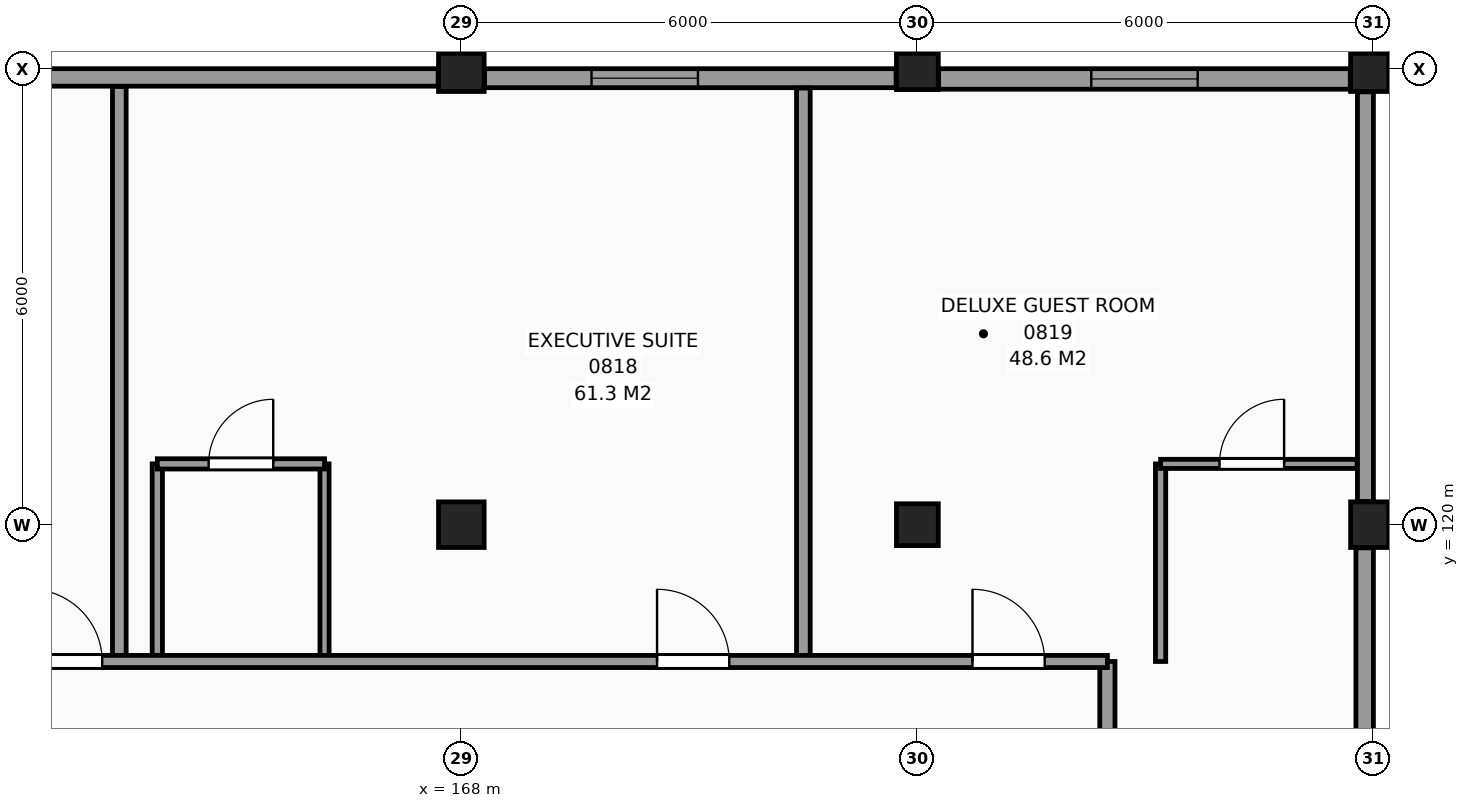
"""IFC4 building model, lengths in metres.
Left out: names, types, materials, properties, quantities, classifications, styles, units other than length and angle.
Written with IfcOpenShell. Run it as: python <this file> out.ifc"""

import sys

from ifc_helpers import new_model, si_unit, direction, frame, frame_2d, origin, origin_2d, place, context, subcontext, project, spatial, rectangle, extrude, element, fill, save


model = new_model("IFC4")
c1 = context("Model", 3, precision=1e-05, world=origin(), true_north=direction((0.0, 1.0)))
c2 = subcontext(c1, "Body", "Model", "MODEL_VIEW")
j1 = project(units=[si_unit("LENGTHUNIT", "METRE"), si_unit("PLANEANGLEUNIT", "RADIAN")], contexts=[c1])
p1 = place(None, origin())
s1 = spatial("IfcSite", under=j1, at=p1, CompositionType="ELEMENT")
p2 = place(p1, origin())
s2 = spatial("IfcBuilding", under=s1, at=p2, CompositionType="ELEMENT")
p3 = place(p2, frame((0.0, 0.0, 34.8)))
s3 = spatial("IfcBuildingStorey", under=s2, at=p3, CompositionType="ELEMENT", Elevation=34.8)
for number, where, z_axis, x_axis in (
    (1, (168.0, 120.0, 0.0), (0.0, 0.0, 1.0), (1.0, 0.0, 0.0)),
    (2, (168.0, 126.0, 0.0), (0.0, 0.0, 1.0), (1.0, 0.0, 0.0)),
):
    element("IfcColumn", number, at=place(p3, frame(where, z_axis=z_axis, x_axis=x_axis)), inside=s3, PredefinedType="COLUMN", context=c2, shape_type="SweptSolid", body=[
        extrude(rectangle(XDim=0.6, YDim=0.6, at=origin_2d()), origin(), (0.0, 0.0, 1.0), 3.3),
    ])
for number, where, z_axis, x_axis in (
    (3, (174.0, 120.0, 0.0), (0.0, 0.0, 1.0), (1.0, 0.0, 0.0)),
    (4, (174.0, 126.0, 0.0), (0.0, 0.0, 1.0), (1.0, 0.0, 0.0)),
):
    element("IfcColumn", number, at=place(p3, frame(where, z_axis=z_axis, x_axis=x_axis)), inside=s3, PredefinedType="COLUMN", context=c2, shape_type="SweptSolid", body=[
        extrude(rectangle(XDim=0.55, YDim=0.55, at=origin_2d()), origin(), (0.0, 0.0, 1.0), 3.3),
    ])
for number, where, z_axis, x_axis in (
    (5, (180.0, 120.0, 0.0), (0.0, 0.0, 1.0), (1.0, 0.0, 0.0)),
    (6, (180.0, 126.0, 0.0), (0.0, 0.0, 1.0), (1.0, 0.0, 0.0)),
):
    element("IfcColumn", number, at=place(p3, frame(where, z_axis=z_axis, x_axis=x_axis)), inside=s3, PredefinedType="COLUMN", context=c2, shape_type="SweptSolid", body=[
        extrude(rectangle(XDim=0.6, YDim=0.6, at=origin_2d()), origin(), (0.0, 0.0, 1.0), 3.3),
    ])
p4 = place(p3, frame((179.885, 114.305, 0.0), z_axis=(0.0, 0.0, 1.0), x_axis=(0.0, 1.0, 0.0)))
e7 = element("IfcWall", 7, at=p4, inside=s3, PredefinedType="SOLIDWALL", context=c2, shape_type="SweptSolid", body=[
    extrude(rectangle(XDim=5.39, YDim=0.23, at=frame_2d((2.695, 0.0))), origin(), (0.0, 0.0, 1.0), 2.42),
])
p5 = place(p3, frame((179.895, 120.305, 0.0), z_axis=(0.0, 0.0, 1.0), x_axis=(0.0, 1.0, 0.0)))
e8 = element("IfcWall", 8, at=p5, inside=s3, PredefinedType="SOLIDWALL", context=c2, shape_type="SweptSolid", body=[
    extrude(rectangle(XDim=5.39, YDim=0.21, at=frame_2d((2.695, 0.0))), origin(), (0.0, 0.0, 1.0), 2.42),
])
p6 = place(p3, frame((179.695, 125.865, 0.0), z_axis=(0.0, 0.0, 1.0), x_axis=(-1.0, 0.0, 0.0)))
e9 = element("IfcWall", 9, at=p6, inside=s3, PredefinedType="SOLIDWALL", context=c2, shape_type="SweptSolid", body=[
    extrude(rectangle(XDim=5.415, YDim=0.27, at=frame_2d((2.708, 0.0))), origin(), (0.0, 0.0, 1.0), 2.42),
])
p7 = place(p6, frame((2.007, 0.0, 0.8)))
e10 = element("IfcOpeningElement", 10, at=p7, cuts=e9, PredefinedType="OPENING", context=c2, shape_type="SweptSolid", body=[
    extrude(rectangle(XDim=1.4, YDim=1.4, at=frame_2d((0.7, 0.7))), frame((0.0, 0.145, 0.0), z_axis=(0.0, -1.0, 0.0), x_axis=(1.0, 0.0, 0.0)), (0.0, 0.0, 1.0), 0.29),
])
p8 = place(p3, frame((173.72, 125.875, 0.0), z_axis=(0.0, 0.0, 1.0), x_axis=(-1.0, 0.0, 0.0)))
e11 = element("IfcWall", 11, at=p8, inside=s3, PredefinedType="SOLIDWALL", context=c2, shape_type="SweptSolid", body=[
    extrude(rectangle(XDim=5.415, YDim=0.25, at=frame_2d((2.708, 0.0))), origin(), (0.0, 0.0, 1.0), 2.42),
])
p9 = place(p8, frame((2.607, 0.0, 0.8)))
e12 = element("IfcOpeningElement", 12, at=p9, cuts=e11, PredefinedType="OPENING", context=c2, shape_type="SweptSolid", body=[
    extrude(rectangle(XDim=1.4, YDim=1.4, at=frame_2d((0.7, 0.7))), frame((0.0, 0.135, 0.0), z_axis=(0.0, -1.0, 0.0), x_axis=(1.0, 0.0, 0.0)), (0.0, 0.0, 1.0), 0.27),
])
p10 = place(p3, frame((167.695, 125.885, 0.0), z_axis=(0.0, 0.0, 1.0), x_axis=(-1.0, 0.0, 0.0)))
e13 = element("IfcWall", 13, at=p10, inside=s3, PredefinedType="SOLIDWALL", context=c2, shape_type="SweptSolid", body=[
    extrude(rectangle(XDim=5.415, YDim=0.23, at=frame_2d((2.708, 0.0))), origin(), (0.0, 0.0, 1.0), 2.42),
])
p11 = place(p3, frame((163.5, 118.2, 0.0), z_axis=(0.0, 0.0, 1.0), x_axis=(0.0, 1.0, 0.0)))
e14 = element("IfcWall", 14, at=p11, inside=s3, PredefinedType="PARTITIONING", context=c2, shape_type="SweptSolid", body=[
    extrude(rectangle(XDim=7.565, YDim=0.18, at=frame_2d((3.782, 0.0))), origin(), (0.0, 0.0, 1.0), 3.07),
])
p12 = place(p3, frame((164.0, 118.2, 0.0), z_axis=(0.0, 0.0, 1.0), x_axis=(0.0, 1.0, 0.0)))
e15 = element("IfcWall", 15, at=p12, inside=s3, PredefinedType="PARTITIONING", context=c2, shape_type="SweptSolid", body=[
    extrude(rectangle(XDim=2.6, YDim=0.135, at=frame_2d((1.3, 0.0))), origin(), (0.0, 0.0, 1.0), 3.07),
])
p13 = place(p3, frame((166.2, 118.2, 0.0), z_axis=(0.0, 0.0, 1.0), x_axis=(0.0, 1.0, 0.0)))
e16 = element("IfcWall", 16, at=p13, inside=s3, PredefinedType="PARTITIONING", context=c2, shape_type="SweptSolid", body=[
    extrude(rectangle(XDim=2.6, YDim=0.12, at=frame_2d((1.3, 0.0))), origin(), (0.0, 0.0, 1.0), 3.07),
])
p14 = place(p3, frame((172.5, 118.2, 0.0), z_axis=(0.0, 0.0, 1.0), x_axis=(0.0, 1.0, 0.0)))
e17 = element("IfcWall", 17, at=p14, inside=s3, PredefinedType="PARTITIONING", context=c2, shape_type="SweptSolid", body=[
    extrude(rectangle(XDim=7.545, YDim=0.18, at=frame_2d((3.772, 0.0))), origin(), (0.0, 0.0, 1.0), 3.07),
])
p15 = place(p3, frame((176.5, 115.8, 0.0), z_axis=(0.0, 0.0, 1.0), x_axis=(0.0, 1.0, 0.0)))
e18 = element("IfcWall", 18, at=p15, inside=s3, PredefinedType="PARTITIONING", context=c2, shape_type="SweptSolid", body=[
    extrude(rectangle(XDim=2.4, YDim=0.2, at=frame_2d((1.2, 0.0))), origin(), (0.0, 0.0, 1.0), 3.07),
])
p16 = place(p3, frame((177.2, 118.2, 0.0), z_axis=(0.0, 0.0, 1.0), x_axis=(0.0, 1.0, 0.0)))
e19 = element("IfcWall", 19, at=p16, inside=s3, PredefinedType="PARTITIONING", context=c2, shape_type="SweptSolid", body=[
    extrude(rectangle(XDim=2.6, YDim=0.135, at=frame_2d((1.3, 0.0))), origin(), (0.0, 0.0, 1.0), 3.07),
])
p17 = place(p3, frame((66.275, 118.2, 0.0), z_axis=(0.0, 0.0, 1.0), x_axis=(1.0, 0.0, 0.0)))
e20 = element("IfcWall", 20, at=p17, inside=s3, PredefinedType="PARTITIONING", context=c2, shape_type="SweptSolid", body=[
    extrude(rectangle(XDim=110.225, YDim=0.16, at=frame_2d((55.113, 0.0))), origin(), (0.0, 0.0, 1.0), 3.07),
])
p18 = place(p17, frame((0.45, 0.0, 0.0)))
e21 = element("IfcOpeningElement", 21, at=p18, cuts=e20, PredefinedType="OPENING", context=c2, shape_type="SweptSolid", body=[
    extrude(rectangle(XDim=0.95, YDim=2.1, at=frame_2d((0.475, 1.05))), frame((0.0, 0.09, 0.0), z_axis=(0.0, -1.0, 0.0), x_axis=(1.0, 0.0, 0.0)), (0.0, 0.0, 1.0), 0.18),
])
p19 = place(p17, frame((4.85, 0.0, 0.0)))
e22 = element("IfcOpeningElement", 22, at=p19, cuts=e20, PredefinedType="OPENING", context=c2, shape_type="SweptSolid", body=[
    extrude(rectangle(XDim=0.95, YDim=2.1, at=frame_2d((0.475, 1.05))), frame((0.0, 0.09, 0.0), z_axis=(0.0, -1.0, 0.0), x_axis=(1.0, 0.0, 0.0)), (0.0, 0.0, 1.0), 0.18),
])
p20 = place(p17, frame((9.35, 0.0, 0.0)))
e23 = element("IfcOpeningElement", 23, at=p20, cuts=e20, PredefinedType="OPENING", context=c2, shape_type="SweptSolid", body=[
    extrude(rectangle(XDim=0.95, YDim=2.1, at=frame_2d((0.475, 1.05))), frame((0.0, 0.09, 0.0), z_axis=(0.0, -1.0, 0.0), x_axis=(1.0, 0.0, 0.0)), (0.0, 0.0, 1.0), 0.18),
])
p21 = place(p17, frame((18.45, 0.0, 0.0)))
e24 = element("IfcOpeningElement", 24, at=p21, cuts=e20, PredefinedType="OPENING", context=c2, shape_type="SweptSolid", body=[
    extrude(rectangle(XDim=0.95, YDim=2.1, at=frame_2d((0.475, 1.05))), frame((0.0, 0.09, 0.0), z_axis=(0.0, -1.0, 0.0), x_axis=(1.0, 0.0, 0.0)), (0.0, 0.0, 1.0), 0.18),
])
p22 = place(p17, frame((22.85, 0.0, 0.0)))
e25 = element("IfcOpeningElement", 25, at=p22, cuts=e20, PredefinedType="OPENING", context=c2, shape_type="SweptSolid", body=[
    extrude(rectangle(XDim=0.95, YDim=2.1, at=frame_2d((0.475, 1.05))), frame((0.0, 0.09, 0.0), z_axis=(0.0, -1.0, 0.0), x_axis=(1.0, 0.0, 0.0)), (0.0, 0.0, 1.0), 0.18),
])
p23 = place(p17, frame((27.35, 0.0, 0.0)))
e26 = element("IfcOpeningElement", 26, at=p23, cuts=e20, PredefinedType="OPENING", context=c2, shape_type="SweptSolid", body=[
    extrude(rectangle(XDim=0.95, YDim=2.1, at=frame_2d((0.475, 1.05))), frame((0.0, 0.09, 0.0), z_axis=(0.0, -1.0, 0.0), x_axis=(1.0, 0.0, 0.0)), (0.0, 0.0, 1.0), 0.18),
])
p24 = place(p17, frame((42.05, 0.0, 0.0)))
e27 = element("IfcOpeningElement", 27, at=p24, cuts=e20, PredefinedType="OPENING", context=c2, shape_type="SweptSolid", body=[
    extrude(rectangle(XDim=0.95, YDim=2.1, at=frame_2d((0.475, 1.05))), frame((0.0, 0.09, 0.0), z_axis=(0.0, -1.0, 0.0), x_axis=(1.0, 0.0, 0.0)), (0.0, 0.0, 1.0), 0.18),
])
p25 = place(p17, frame((50.3, 0.0, 0.0)))
e28 = element("IfcOpeningElement", 28, at=p25, cuts=e20, PredefinedType="OPENING", context=c2, shape_type="SweptSolid", body=[
    extrude(rectangle(XDim=0.95, YDim=2.1, at=frame_2d((0.475, 1.05))), frame((0.0, 0.09, 0.0), z_axis=(0.0, -1.0, 0.0), x_axis=(1.0, 0.0, 0.0)), (0.0, 0.0, 1.0), 0.18),
])
p26 = place(p17, frame((52.85, 0.0, 0.0)))
e29 = element("IfcOpeningElement", 29, at=p26, cuts=e20, PredefinedType="OPENING", context=c2, shape_type="SweptSolid", body=[
    extrude(rectangle(XDim=0.95, YDim=2.1, at=frame_2d((0.475, 1.05))), frame((0.0, 0.09, 0.0), z_axis=(0.0, -1.0, 0.0), x_axis=(1.0, 0.0, 0.0)), (0.0, 0.0, 1.0), 0.18),
])
p27 = place(p17, frame((60.05, 0.0, 0.0)))
e30 = element("IfcOpeningElement", 30, at=p27, cuts=e20, PredefinedType="OPENING", context=c2, shape_type="SweptSolid", body=[
    extrude(rectangle(XDim=0.95, YDim=2.1, at=frame_2d((0.475, 1.05))), frame((0.0, 0.09, 0.0), z_axis=(0.0, -1.0, 0.0), x_axis=(1.0, 0.0, 0.0)), (0.0, 0.0, 1.0), 0.18),
])
p28 = place(p17, frame((64.25, 0.0, 0.0)))
e31 = element("IfcOpeningElement", 31, at=p28, cuts=e20, PredefinedType="OPENING", context=c2, shape_type="SweptSolid", body=[
    extrude(rectangle(XDim=0.95, YDim=2.1, at=frame_2d((0.475, 1.05))), frame((0.0, 0.09, 0.0), z_axis=(0.0, -1.0, 0.0), x_axis=(1.0, 0.0, 0.0)), (0.0, 0.0, 1.0), 0.18),
])
p29 = place(p17, frame((66.45, 0.0, 0.0)))
e32 = element("IfcOpeningElement", 32, at=p29, cuts=e20, PredefinedType="OPENING", context=c2, shape_type="SweptSolid", body=[
    extrude(rectangle(XDim=0.95, YDim=2.1, at=frame_2d((0.475, 1.05))), frame((0.0, 0.09, 0.0), z_axis=(0.0, -1.0, 0.0), x_axis=(1.0, 0.0, 0.0)), (0.0, 0.0, 1.0), 0.18),
])
p30 = place(p17, frame((72.45, 0.0, 0.0)))
e33 = element("IfcOpeningElement", 33, at=p30, cuts=e20, PredefinedType="OPENING", context=c2, shape_type="SweptSolid", body=[
    extrude(rectangle(XDim=0.95, YDim=2.1, at=frame_2d((0.475, 1.05))), frame((0.0, 0.09, 0.0), z_axis=(0.0, -1.0, 0.0), x_axis=(1.0, 0.0, 0.0)), (0.0, 0.0, 1.0), 0.18),
])
p31 = place(p17, frame((82.25, 0.0, 0.0)))
e34 = element("IfcOpeningElement", 34, at=p31, cuts=e20, PredefinedType="OPENING", context=c2, shape_type="SweptSolid", body=[
    extrude(rectangle(XDim=0.95, YDim=2.1, at=frame_2d((0.475, 1.05))), frame((0.0, 0.09, 0.0), z_axis=(0.0, -1.0, 0.0), x_axis=(1.0, 0.0, 0.0)), (0.0, 0.0, 1.0), 0.18),
])
p32 = place(p17, frame((84.45, 0.0, 0.0)))
e35 = element("IfcOpeningElement", 35, at=p32, cuts=e20, PredefinedType="OPENING", context=c2, shape_type="SweptSolid", body=[
    extrude(rectangle(XDim=0.95, YDim=2.1, at=frame_2d((0.475, 1.05))), frame((0.0, 0.09, 0.0), z_axis=(0.0, -1.0, 0.0), x_axis=(1.0, 0.0, 0.0)), (0.0, 0.0, 1.0), 0.18),
])
p33 = place(p17, frame((88.85, 0.0, 0.0)))
e36 = element("IfcOpeningElement", 36, at=p33, cuts=e20, PredefinedType="OPENING", context=c2, shape_type="SweptSolid", body=[
    extrude(rectangle(XDim=0.95, YDim=2.1, at=frame_2d((0.475, 1.05))), frame((0.0, 0.09, 0.0), z_axis=(0.0, -1.0, 0.0), x_axis=(1.0, 0.0, 0.0)), (0.0, 0.0, 1.0), 0.18),
])
p34 = place(p17, frame((96.05, 0.0, 0.0)))
e37 = element("IfcOpeningElement", 37, at=p34, cuts=e20, PredefinedType="OPENING", context=c2, shape_type="SweptSolid", body=[
    extrude(rectangle(XDim=0.95, YDim=2.1, at=frame_2d((0.475, 1.05))), frame((0.0, 0.09, 0.0), z_axis=(0.0, -1.0, 0.0), x_axis=(1.0, 0.0, 0.0)), (0.0, 0.0, 1.0), 0.18),
])
p35 = place(p17, frame((104.3, 0.0, 0.0)))
e38 = element("IfcOpeningElement", 38, at=p35, cuts=e20, PredefinedType="OPENING", context=c2, shape_type="SweptSolid", body=[
    extrude(rectangle(XDim=0.95, YDim=2.1, at=frame_2d((0.475, 1.05))), frame((0.0, 0.09, 0.0), z_axis=(0.0, -1.0, 0.0), x_axis=(1.0, 0.0, 0.0)), (0.0, 0.0, 1.0), 0.18),
])
p36 = place(p17, frame((108.45, 0.0, 0.0)))
e39 = element("IfcOpeningElement", 39, at=p36, cuts=e20, PredefinedType="OPENING", context=c2, shape_type="SweptSolid", body=[
    extrude(rectangle(XDim=0.95, YDim=2.1, at=frame_2d((0.475, 1.05))), frame((0.0, 0.09, 0.0), z_axis=(0.0, -1.0, 0.0), x_axis=(1.0, 0.0, 0.0)), (0.0, 0.0, 1.0), 0.18),
])
p37 = place(p3, frame((164.0, 120.8, 0.0), z_axis=(0.0, 0.0, 1.0), x_axis=(1.0, 0.0, 0.0)))
e40 = element("IfcWall", 40, at=p37, inside=s3, PredefinedType="PARTITIONING", context=c2, shape_type="SweptSolid", body=[
    extrude(rectangle(XDim=2.2, YDim=0.135, at=frame_2d((1.1, 0.0))), origin(), (0.0, 0.0, 1.0), 3.07),
])
p38 = place(p37, frame((0.675, 0.0, 0.0)))
e41 = element("IfcOpeningElement", 41, at=p38, cuts=e40, PredefinedType="OPENING", context=c2, shape_type="SweptSolid", body=[
    extrude(rectangle(XDim=0.85, YDim=2.1, at=frame_2d((0.425, 1.05))), frame((0.0, 0.078, 0.0), z_axis=(0.0, -1.0, 0.0), x_axis=(1.0, 0.0, 0.0)), (0.0, 0.0, 1.0), 0.155),
])
p39 = place(p3, frame((177.2, 120.8, 0.0), z_axis=(0.0, 0.0, 1.0), x_axis=(1.0, 0.0, 0.0)))
e42 = element("IfcWall", 42, at=p39, inside=s3, PredefinedType="PARTITIONING", context=c2, shape_type="SweptSolid", body=[
    extrude(rectangle(XDim=2.585, YDim=0.12, at=frame_2d((1.292, 0.0))), origin(), (0.0, 0.0, 1.0), 3.07),
])
p40 = place(p39, frame((0.775, 0.0, 0.0)))
e43 = element("IfcOpeningElement", 43, at=p40, cuts=e42, PredefinedType="OPENING", context=c2, shape_type="SweptSolid", body=[
    extrude(rectangle(XDim=0.85, YDim=2.1, at=frame_2d((0.425, 1.05))), frame((0.0, 0.07, 0.0), z_axis=(0.0, -1.0, 0.0), x_axis=(1.0, 0.0, 0.0)), (0.0, 0.0, 1.0), 0.14),
])
p41 = place(p9, origin())
e44 = element("IfcWindow", 44, at=p41, inside=s3, PartitioningType="SINGLE_PANEL", PredefinedType="WINDOW", context=c2, shape_type="SweptSolid", body=[
    extrude(rectangle(XDim=1.4, YDim=1.4, at=frame_2d((0.7, 0.7))), frame((0.0, 0.03, 0.0), z_axis=(0.0, -1.0, 0.0), x_axis=(1.0, 0.0, 0.0)), (0.0, 0.0, 1.0), 0.06),
])
fill(e12, e44)
p42 = place(p7, origin())
e45 = element("IfcWindow", 45, at=p42, inside=s3, PartitioningType="SINGLE_PANEL", PredefinedType="WINDOW", context=c2, shape_type="SweptSolid", body=[
    extrude(rectangle(XDim=1.4, YDim=1.4, at=frame_2d((0.7, 0.7))), frame((0.0, 0.03, 0.0), z_axis=(0.0, -1.0, 0.0), x_axis=(1.0, 0.0, 0.0)), (0.0, 0.0, 1.0), 0.06),
])
fill(e10, e45)
p43 = place(p34, origin())
e46 = element("IfcDoor", 46, at=p43, inside=s3, OperationType="SINGLE_SWING_LEFT", PredefinedType="DOOR", context=c2, shape_type="SweptSolid", body=[
    extrude(rectangle(XDim=0.95, YDim=2.1, at=frame_2d((0.475, 1.05))), frame((0.0, 0.025, 0.0), z_axis=(0.0, -1.0, 0.0), x_axis=(1.0, 0.0, 0.0)), (0.0, 0.0, 1.0), 0.05),
])
fill(e37, e46)
p44 = place(p38, origin())
e47 = element("IfcDoor", 47, at=p44, inside=s3, OperationType="SINGLE_SWING_RIGHT", PredefinedType="DOOR", context=c2, shape_type="SweptSolid", body=[
    extrude(rectangle(XDim=0.85, YDim=2.1, at=frame_2d((0.425, 1.05))), frame((0.0, 0.025, 0.0), z_axis=(0.0, -1.0, 0.0), x_axis=(1.0, 0.0, 0.0)), (0.0, 0.0, 1.0), 0.05),
])
fill(e41, e47)
p45 = place(p35, origin())
e48 = element("IfcDoor", 48, at=p45, inside=s3, OperationType="SINGLE_SWING_LEFT", PredefinedType="DOOR", context=c2, shape_type="SweptSolid", body=[
    extrude(rectangle(XDim=0.95, YDim=2.1, at=frame_2d((0.475, 1.05))), frame((0.0, 0.025, 0.0), z_axis=(0.0, -1.0, 0.0), x_axis=(1.0, 0.0, 0.0)), (0.0, 0.0, 1.0), 0.05),
])
fill(e38, e48)
p46 = place(p40, origin())
e49 = element("IfcDoor", 49, at=p46, inside=s3, OperationType="SINGLE_SWING_RIGHT", PredefinedType="DOOR", context=c2, shape_type="SweptSolid", body=[
    extrude(rectangle(XDim=0.85, YDim=2.1, at=frame_2d((0.425, 1.05))), frame((0.0, 0.025, 0.0), z_axis=(0.0, -1.0, 0.0), x_axis=(1.0, 0.0, 0.0)), (0.0, 0.0, 1.0), 0.05),
])
fill(e43, e49)
p47 = place(p36, origin())
e50 = element("IfcDoor", 50, at=p47, inside=s3, OperationType="SINGLE_SWING_LEFT", PredefinedType="DOOR", context=c2, shape_type="SweptSolid", body=[
    extrude(rectangle(XDim=0.95, YDim=2.1, at=frame_2d((0.475, 1.05))), frame((0.0, 0.025, 0.0), z_axis=(0.0, -1.0, 0.0), x_axis=(1.0, 0.0, 0.0)), (0.0, 0.0, 1.0), 0.05),
])
fill(e39, e50)
save(model, sys.argv[1])
